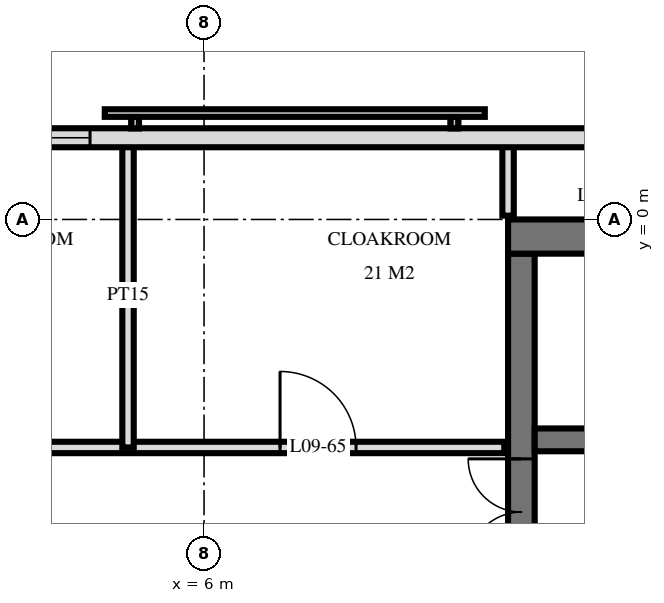
"""IFC4 building model, lengths in metres.
Left out: names, types, materials, properties, quantities, classifications, styles, units other than length and angle.
Written with IfcOpenShell. Run it as: python <this file> out.ifc"""

import sys

from ifc_helpers import new_model, si_unit, direction, frame, frame_2d, origin, place, context, subcontext, project, spatial, rectangle, extrude, element, fill, save


model = new_model("IFC4")
c1 = context("Model", 3, precision=1e-05, world=origin(), true_north=direction((0.0, 1.0)))
c2 = subcontext(c1, "Body", "Model", "MODEL_VIEW")
j1 = project(units=[si_unit("LENGTHUNIT", "METRE"), si_unit("PLANEANGLEUNIT", "RADIAN")], contexts=[c1])
p1 = place(None, origin())
s1 = spatial("IfcSite", under=j1, at=p1, CompositionType="ELEMENT")
p2 = place(p1, origin())
s2 = spatial("IfcBuilding", under=s1, at=p2, CompositionType="ELEMENT")
p3 = place(p2, frame((0.0, 0.0, 42.0)))
s3 = spatial("IfcBuildingStorey", under=s2, at=p3, CompositionType="ELEMENT", Elevation=42.0)
p4 = place(p3, frame((10.0, -0.225, 0.0), z_axis=(0.0, 0.0, 1.0), x_axis=(1.0, 0.0, 0.0)))
e1 = element("IfcWall", 1, at=p4, inside=s3, PredefinedType="SHEAR", context=c2, shape_type="SweptSolid", body=[
    extrude(rectangle(XDim=19.5, YDim=0.45, at=frame_2d((9.75, 0.0))), origin(), (0.0, 0.0, 1.0), 3.6),
])
p5 = place(p3, frame((10.175, -14.55, 0.0), z_axis=(0.0, 0.0, 1.0), x_axis=(0.0, 1.0, 0.0)))
e2 = element("IfcWall", 2, at=p5, inside=s3, PredefinedType="SHEAR", context=c2, shape_type="SweptSolid", body=[
    extrude(rectangle(XDim=14.1, YDim=0.35, at=frame_2d((7.05, 0.0))), origin(), (0.0, 0.0, 1.0), 3.6),
])
p6 = place(p5, frame((8.4, 0.0, 0.0)))
e3 = element("IfcOpeningElement", 3, at=p6, cuts=e2, PredefinedType="OPENING", context=c2, shape_type="SweptSolid", body=[
    extrude(rectangle(XDim=1.4, YDim=2.4, at=frame_2d((0.7, 1.2))), frame((0.0, 0.185, 0.0), z_axis=(0.0, -1.0, 0.0), x_axis=(1.0, 0.0, 0.0)), (0.0, 0.0, 1.0), 0.37),
])
p7 = place(p5, frame((10.0, 0.0, 0.0)))
e4 = element("IfcOpeningElement", 4, at=p7, cuts=e2, PredefinedType="OPENING", context=c2, shape_type="SweptSolid", body=[
    extrude(rectangle(XDim=1.4, YDim=2.4, at=frame_2d((0.7, 1.2))), frame((0.0, 0.185, 0.0), z_axis=(0.0, -1.0, 0.0), x_axis=(1.0, 0.0, 0.0)), (0.0, 0.0, 1.0), 0.37),
])
p8 = place(p5, frame((4.0, 0.0, 0.0)))
e5 = element("IfcOpeningElement", 5, at=p8, cuts=e2, PredefinedType="OPENING", context=c2, shape_type="SweptSolid", body=[
    extrude(rectangle(XDim=1.2, YDim=2.1, at=frame_2d((0.6, 1.05))), frame((0.0, 0.185, 0.0), z_axis=(0.0, -1.0, 0.0), x_axis=(1.0, 0.0, 0.0)), (0.0, 0.0, 1.0), 0.37),
])
p9 = place(p3, frame((10.35, -2.9, 0.0), z_axis=(0.0, 0.0, 1.0), x_axis=(1.0, 0.0, 0.0)))
e6 = element("IfcWall", 6, at=p9, inside=s3, PredefinedType="SHEAR", context=c2, shape_type="SweptSolid", body=[
    extrude(rectangle(XDim=18.7, YDim=0.3, at=frame_2d((9.35, 0.0))), origin(), (0.0, 0.0, 1.0), 3.6),
])
p10 = place(p9, frame((14.65, 0.0, 0.0)))
e7 = element("IfcOpeningElement", 7, at=p10, cuts=e6, PredefinedType="OPENING", context=c2, shape_type="SweptSolid", body=[
    extrude(rectangle(XDim=1.1, YDim=2.1, at=frame_2d((0.55, 1.05))), frame((0.0, 0.16, 0.0), z_axis=(0.0, -1.0, 0.0), x_axis=(1.0, 0.0, 0.0)), (0.0, 0.0, 1.0), 0.32),
])
p11 = place(p9, frame((17.05, 0.0, 0.0)))
e8 = element("IfcOpeningElement", 8, at=p11, cuts=e6, PredefinedType="OPENING", context=c2, shape_type="SweptSolid", body=[
    extrude(rectangle(XDim=1.1, YDim=2.1, at=frame_2d((0.55, 1.05))), frame((0.0, 0.16, 0.0), z_axis=(0.0, -1.0, 0.0), x_axis=(1.0, 0.0, 0.0)), (0.0, 0.0, 1.0), 0.32),
])
p12 = place(p9, frame((6.9, 0.0, 0.0)))
e9 = element("IfcOpeningElement", 9, at=p12, cuts=e6, PredefinedType="OPENING", context=c2, shape_type="SweptSolid", body=[
    extrude(rectangle(XDim=0.9, YDim=2.1, at=frame_2d((0.45, 1.05))), frame((0.0, 0.16, 0.0), z_axis=(0.0, -1.0, 0.0), x_axis=(1.0, 0.0, 0.0)), (0.0, 0.0, 1.0), 0.32),
])
p13 = place(p9, frame((0.85, 0.0, 0.0)))
e10 = element("IfcOpeningElement", 10, at=p13, cuts=e6, PredefinedType="OPENING", context=c2, shape_type="SweptSolid", body=[
    extrude(rectangle(XDim=1.0, YDim=2.1, at=frame_2d((0.5, 1.05))), frame((0.0, 0.16, 0.0), z_axis=(0.0, -1.0, 0.0), x_axis=(1.0, 0.0, 0.0)), (0.0, 0.0, 1.0), 0.32),
])
p14 = place(p9, frame((3.387, 0.0, 0.0)))
e11 = element("IfcOpeningElement", 11, at=p14, cuts=e6, PredefinedType="OPENING", context=c2, shape_type="SweptSolid", body=[
    extrude(rectangle(XDim=1.0, YDim=2.1, at=frame_2d((0.5, 1.05))), frame((0.0, 0.16, 0.0), z_axis=(0.0, -1.0, 0.0), x_axis=(1.0, 0.0, 0.0)), (0.0, 0.0, 1.0), 0.32),
])
p15 = place(p9, frame((4.812, 0.0, 0.0)))
e12 = element("IfcOpeningElement", 12, at=p15, cuts=e6, PredefinedType="OPENING", context=c2, shape_type="SweptSolid", body=[
    extrude(rectangle(XDim=1.0, YDim=2.1, at=frame_2d((0.5, 1.05))), frame((0.0, 0.16, 0.0), z_axis=(0.0, -1.0, 0.0), x_axis=(1.0, 0.0, 0.0)), (0.0, 0.0, 1.0), 0.32),
])
p16 = place(p9, frame((12.1, 0.0, 0.0)))
e13 = element("IfcOpeningElement", 13, at=p16, cuts=e6, PredefinedType="OPENING", context=c2, shape_type="SweptSolid", body=[
    extrude(rectangle(XDim=1.0, YDim=2.1, at=frame_2d((0.5, 1.05))), frame((0.0, 0.16, 0.0), z_axis=(0.0, -1.0, 0.0), x_axis=(1.0, 0.0, 0.0)), (0.0, 0.0, 1.0), 0.32),
])
p17 = place(p3, frame((28.775, 1.075, 0.0), z_axis=(0.0, 0.0, 1.0), x_axis=(-1.0, 0.0, 0.0)))
e14 = element("IfcWall", 14, at=p17, inside=s3, PredefinedType="SOLIDWALL", context=c2, shape_type="SweptSolid", body=[
    extrude(rectangle(XDim=57.551, YDim=0.25, at=frame_2d((28.775, 0.0))), origin(), (0.0, 0.0, 1.0), 3.32),
])
p18 = place(p17, frame((24.275, 0.0, 0.3)))
e15 = element("IfcOpeningElement", 15, at=p18, cuts=e14, PredefinedType="OPENING", context=c2, shape_type="SweptSolid", body=[
    extrude(rectangle(XDim=2.4, YDim=2.1, at=frame_2d((1.2, 1.05))), frame((0.0, 0.135, 0.0), z_axis=(0.0, -1.0, 0.0), x_axis=(1.0, 0.0, 0.0)), (0.0, 0.0, 1.0), 0.27),
])
p19 = place(p17, frame((35.325, 0.0, 0.3)))
e16 = element("IfcOpeningElement", 16, at=p19, cuts=e14, PredefinedType="OPENING", context=c2, shape_type="SweptSolid", body=[
    extrude(rectangle(XDim=2.4, YDim=2.1, at=frame_2d((1.2, 1.05))), frame((0.0, 0.135, 0.0), z_axis=(0.0, -1.0, 0.0), x_axis=(1.0, 0.0, 0.0)), (0.0, 0.0, 1.0), 0.27),
])
p20 = place(p3, frame((10.0, 0.05, 0.0), z_axis=(0.0, 0.0, 1.0), x_axis=(0.0, 1.0, 0.0)))
e17 = element("IfcWall", 17, at=p20, inside=s3, PredefinedType="PARTITIONING", context=c2, shape_type="SweptSolid", body=[
    extrude(rectangle(XDim=0.97, YDim=0.15, at=frame_2d((0.485, 0.0))), origin(), (0.0, 0.0, 1.0), 3.32),
])
p21 = place(p3, frame((5.0, -3.0, 0.0), z_axis=(0.0, 0.0, 1.0), x_axis=(0.0, 1.0, 0.0)))
e18 = element("IfcWall", 18, at=p21, inside=s3, PredefinedType="PARTITIONING", context=c2, shape_type="SweptSolid", body=[
    extrude(rectangle(XDim=4.02, YDim=0.15, at=frame_2d((2.01, 0.0))), origin(), (0.0, 0.0, 1.0), 3.32),
])
p22 = place(p3, frame((-9.95, -3.0, 0.0), z_axis=(0.0, 0.0, 1.0), x_axis=(1.0, 0.0, 0.0)))
e19 = element("IfcWall", 19, at=p22, inside=s3, PredefinedType="PARTITIONING", context=c2, shape_type="SweptSolid", body=[
    extrude(rectangle(XDim=19.9, YDim=0.15, at=frame_2d((9.95, 0.0))), origin(), (0.0, 0.0, 1.0), 3.32),
])
p23 = place(p22, frame((1.7, 0.0, 0.0)))
e20 = element("IfcOpeningElement", 20, at=p23, cuts=e19, PredefinedType="OPENING", context=c2, shape_type="SweptSolid", body=[
    extrude(rectangle(XDim=1.0, YDim=2.1, at=frame_2d((0.5, 1.05))), frame((0.0, 0.085, 0.0), z_axis=(0.0, -1.0, 0.0), x_axis=(1.0, 0.0, 0.0)), (0.0, 0.0, 1.0), 0.17),
])
p24 = place(p22, frame((5.45, 0.0, 0.0)))
e21 = element("IfcOpeningElement", 21, at=p24, cuts=e19, PredefinedType="OPENING", context=c2, shape_type="SweptSolid", body=[
    extrude(rectangle(XDim=1.0, YDim=2.1, at=frame_2d((0.5, 1.05))), frame((0.0, 0.085, 0.0), z_axis=(0.0, -1.0, 0.0), x_axis=(1.0, 0.0, 0.0)), (0.0, 0.0, 1.0), 0.17),
])
p25 = place(p22, frame((8.2, 0.0, 0.0)))
e22 = element("IfcOpeningElement", 22, at=p25, cuts=e19, PredefinedType="OPENING", context=c2, shape_type="SweptSolid", body=[
    extrude(rectangle(XDim=1.0, YDim=2.1, at=frame_2d((0.5, 1.05))), frame((0.0, 0.085, 0.0), z_axis=(0.0, -1.0, 0.0), x_axis=(1.0, 0.0, 0.0)), (0.0, 0.0, 1.0), 0.17),
])
p26 = place(p22, frame((11.95, 0.0, 0.0)))
e23 = element("IfcOpeningElement", 23, at=p26, cuts=e19, PredefinedType="OPENING", context=c2, shape_type="SweptSolid", body=[
    extrude(rectangle(XDim=1.0, YDim=2.1, at=frame_2d((0.5, 1.05))), frame((0.0, 0.085, 0.0), z_axis=(0.0, -1.0, 0.0), x_axis=(1.0, 0.0, 0.0)), (0.0, 0.0, 1.0), 0.17),
])
p27 = place(p22, frame((16.95, 0.0, 0.0)))
e24 = element("IfcOpeningElement", 24, at=p27, cuts=e19, PredefinedType="OPENING", context=c2, shape_type="SweptSolid", body=[
    extrude(rectangle(XDim=1.0, YDim=2.1, at=frame_2d((0.5, 1.05))), frame((0.0, 0.085, 0.0), z_axis=(0.0, -1.0, 0.0), x_axis=(1.0, 0.0, 0.0)), (0.0, 0.0, 1.0), 0.17),
])
p28 = place(p18, origin())
e25 = element("IfcWindow", 25, at=p28, inside=s3, PartitioningType="SINGLE_PANEL", PredefinedType="WINDOW", context=c2, shape_type="SweptSolid", body=[
    extrude(rectangle(XDim=2.4, YDim=2.1, at=frame_2d((1.2, 1.05))), frame((0.0, 0.03, 0.0), z_axis=(0.0, -1.0, 0.0), x_axis=(1.0, 0.0, 0.0)), (0.0, 0.0, 1.0), 0.06),
])
fill(e15, e25)
p29 = place(p7, origin())
e26 = element("IfcDoor", 26, at=p29, inside=s3, OperationType="DOUBLE_DOOR_SINGLE_SWING", PredefinedType="DOOR", context=c2, shape_type="SweptSolid", body=[
    extrude(rectangle(XDim=1.4, YDim=2.4, at=frame_2d((0.7, 1.2))), frame((0.0, 0.025, 0.0), z_axis=(0.0, -1.0, 0.0), x_axis=(1.0, 0.0, 0.0)), (0.0, 0.0, 1.0), 0.05),
])
fill(e4, e26)
p30 = place(p27, origin())
e27 = element("IfcDoor", 27, at=p30, inside=s3, OperationType="SINGLE_SWING_RIGHT", PredefinedType="DOOR", context=c2, shape_type="SweptSolid", body=[
    extrude(rectangle(XDim=1.0, YDim=2.1, at=frame_2d((0.5, 1.05))), frame((0.0, 0.025, 0.0), z_axis=(0.0, -1.0, 0.0), x_axis=(1.0, 0.0, 0.0)), (0.0, 0.0, 1.0), 0.05),
])
fill(e24, e27)
save(model, sys.argv[1])
